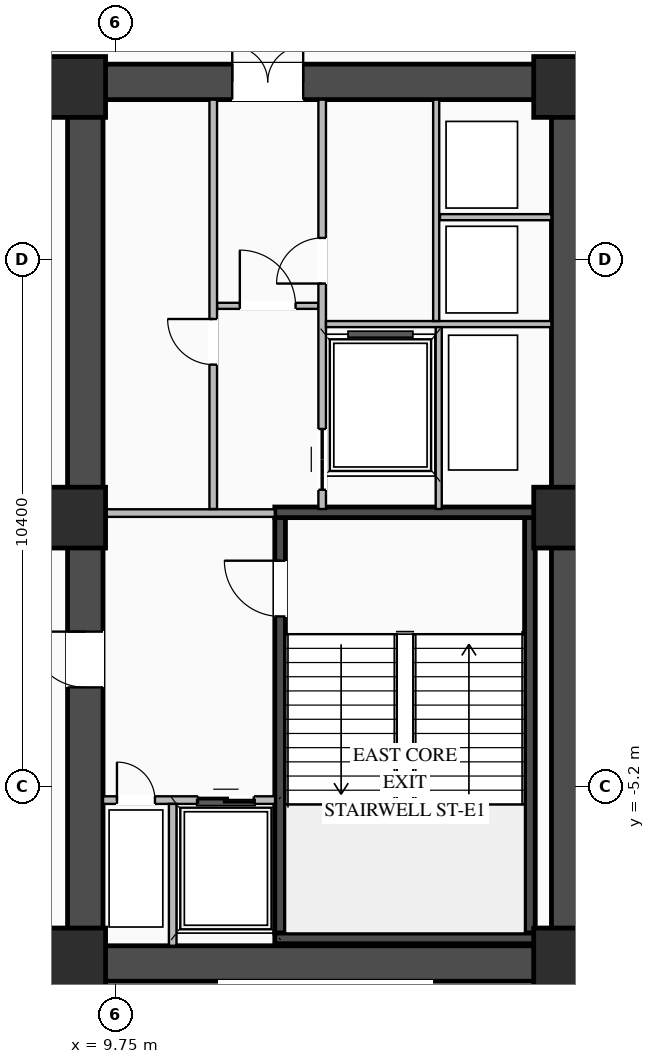
"""IFC4 building model, lengths in metres.
Left out: names, types, materials, properties, quantities, classifications, styles, units other than length and angle.
Written with IfcOpenShell. Run it as: python <this file> out.ifc"""

import sys

from ifc_helpers import new_model, si_unit, direction, frame, frame_2d, origin, origin_2d, place, context, subcontext, project, spatial, rectangle, extrude, element, fill, save


model = new_model("IFC4")
c1 = context("Model", 3, precision=1e-05, world=origin(), true_north=direction((0.0, 1.0)))
c2 = subcontext(c1, "Body", "Model", "MODEL_VIEW")
j1 = project(units=[si_unit("LENGTHUNIT", "METRE"), si_unit("PLANEANGLEUNIT", "RADIAN")], contexts=[c1])
p1 = place(None, origin())
s1 = spatial("IfcSite", under=j1, at=p1, CompositionType="ELEMENT")
p2 = place(p1, origin())
s2 = spatial("IfcBuilding", under=s1, at=p2, CompositionType="ELEMENT")
p3 = place(p2, frame((0.0, 0.0, -4.8)))
s3 = spatial("IfcBuildingStorey", under=s2, at=p3, CompositionType="ELEMENT", Elevation=-4.8)
p4 = place(p3, frame((8.8, -8.7, 0.0), z_axis=(0.0, 0.0, 1.0), x_axis=(1.0, 0.0, 0.0)))
e1 = element("IfcWall", 1, at=p4, inside=s3, PredefinedType="SHEAR", context=c2, shape_type="SweptSolid", body=[
    extrude(rectangle(XDim=10.25, YDim=0.7, at=frame_2d((5.125, 0.0))), origin(), (0.0, 0.0, 1.0), 4.45),
])
p5 = place(p3, frame((8.8, 8.7, 0.0), z_axis=(0.0, 0.0, 1.0), x_axis=(1.0, 0.0, 0.0)))
e2 = element("IfcWall", 2, at=p5, inside=s3, PredefinedType="SHEAR", context=c2, shape_type="SweptSolid", body=[
    extrude(rectangle(XDim=10.25, YDim=0.7, at=frame_2d((5.125, 0.0))), origin(), (0.0, 0.0, 1.0), 4.45),
])
p6 = place(p5, frame((3.25, 0.0, 0.0)))
e3 = element("IfcOpeningElement", 3, at=p6, cuts=e2, PredefinedType="OPENING", context=c2, shape_type="SweptSolid", body=[
    extrude(rectangle(XDim=1.4, YDim=2.05, at=frame_2d((0.7, 1.025))), frame((0.0, 0.36, 0.0), z_axis=(0.0, -1.0, 0.0), x_axis=(1.0, 0.0, 0.0)), (0.0, 0.0, 1.0), 0.72),
])
p7 = place(p3, frame((9.15, -8.35, 0.0), z_axis=(0.0, 0.0, 1.0), x_axis=(0.0, 1.0, 0.0)))
e4 = element("IfcWall", 4, at=p7, inside=s3, PredefinedType="SHEAR", context=c2, shape_type="SweptSolid", body=[
    extrude(rectangle(XDim=16.7, YDim=0.7, at=frame_2d((8.35, 0.0))), origin(), (0.0, 0.0, 1.0), 4.45),
])
p8 = place(p7, frame((5.1, 0.0, 0.0)))
e5 = element("IfcOpeningElement", 5, at=p8, cuts=e4, PredefinedType="OPENING", context=c2, shape_type="SweptSolid", body=[
    extrude(rectangle(XDim=1.1, YDim=2.08, at=frame_2d((0.55, 1.04))), frame((0.0, 0.36, 0.0), z_axis=(0.0, -1.0, 0.0), x_axis=(1.0, 0.0, 0.0)), (0.0, 0.0, 1.0), 0.72),
])
p9 = place(p3, frame((18.7, -8.35, 0.0), z_axis=(0.0, 0.0, 1.0), x_axis=(0.0, 1.0, 0.0)))
e6 = element("IfcWall", 6, at=p9, inside=s3, PredefinedType="SHEAR", context=c2, shape_type="SweptSolid", body=[
    extrude(rectangle(XDim=16.7, YDim=0.7, at=frame_2d((8.35, 0.0))), origin(), (0.0, 0.0, 1.0), 4.45),
])
p10 = place(p3, frame((12.995, -8.1, 0.0), z_axis=(0.0, 0.0, 1.0), x_axis=(0.0, 1.0, 0.0)))
e7 = element("IfcWall", 7, at=p10, inside=s3, PredefinedType="SHEAR", context=c2, shape_type="SweptSolid", body=[
    extrude(rectangle(XDim=8.2, YDim=0.21, at=frame_2d((4.1, 0.0))), origin(), (0.0, 0.0, 1.0), 4.45),
])
p11 = place(p10, frame((6.25, 0.0, 0.0)))
e8 = element("IfcOpeningElement", 8, at=p11, cuts=e7, PredefinedType="OPENING", context=c2, shape_type="SweptSolid", body=[
    extrude(rectangle(XDim=1.1, YDim=2.15, at=frame_2d((0.55, 1.075))), frame((0.0, 0.115, 0.0), z_axis=(0.0, -1.0, 0.0), x_axis=(1.0, 0.0, 0.0)), (0.0, 0.0, 1.0), 0.23),
])
p12 = place(p3, frame((17.925, -8.1, 0.0), z_axis=(0.0, 0.0, 1.0), x_axis=(0.0, 1.0, 0.0)))
e9 = element("IfcWall", 9, at=p12, inside=s3, PredefinedType="SHEAR", context=c2, shape_type="SweptSolid", body=[
    extrude(rectangle(XDim=8.2, YDim=0.21, at=frame_2d((4.1, 0.0))), origin(), (0.0, 0.0, 1.0), 4.45),
])
for number, where, z_axis, x_axis in (
    (10, (12.89, -8.205, 0.0), (0.0, 0.0, 1.0), (1.0, 0.0, 0.0)),
    (11, (18.03, 0.205, 0.0), (0.0, 0.0, 1.0), (-1.0, 0.0, 0.0)),
):
    element("IfcWall", number, at=place(p3, frame(where, z_axis=z_axis, x_axis=x_axis)), inside=s3, PredefinedType="SHEAR", context=c2, shape_type="SweptSolid", body=[
        extrude(rectangle(XDim=5.14, YDim=0.21, at=frame_2d((2.57, 0.0))), origin(), (0.0, 0.0, 1.0), 4.45),
    ])
for number, where, z_axis, x_axis in (
    (12, (8.95, -8.6, 0.0), (0.0, 0.0, 1.0), (1.0, 0.0, 0.0)),
    (13, (8.95, 0.1, 0.0), (0.0, 0.0, 1.0), (1.0, 0.0, 0.0)),
    (14, (8.95, 8.6, 0.0), (0.0, 0.0, 1.0), (1.0, 0.0, 0.0)),
    (15, (18.6, -8.6, 0.0), (0.0, 0.0, 1.0), (1.0, 0.0, 0.0)),
    (16, (18.6, 0.1, 0.0), (0.0, 0.0, 1.0), (1.0, 0.0, 0.0)),
    (17, (18.6, 8.6, 0.0), (0.0, 0.0, 1.0), (1.0, 0.0, 0.0)),
):
    element("IfcColumn", number, at=place(p3, frame(where, z_axis=z_axis, x_axis=x_axis)), inside=s3, PredefinedType="COLUMN", context=c2, shape_type="SweptSolid", body=[
        extrude(rectangle(XDim=1.2, YDim=1.2, at=origin_2d()), origin(), (0.0, 0.0, 1.0), 4.8),
    ])
p13 = place(p3, frame((9.5, -5.475, 0.0), z_axis=(0.0, 0.0, 1.0), x_axis=(1.0, 0.0, 0.0)))
e18 = element("IfcWall", 18, at=p13, inside=s3, PredefinedType="STANDARD", context=c2, shape_type="SweptSolid", body=[
    extrude(rectangle(XDim=3.395, YDim=0.15, at=frame_2d((1.698, 0.0))), origin(), (0.0, 0.0, 1.0), 4.43),
])
p14 = place(p13, frame((1.875, 0.0, 0.0)))
e19 = element("IfcOpeningElement", 19, at=p14, cuts=e18, PredefinedType="OPENING", context=c2, shape_type="SweptSolid", body=[
    extrude(rectangle(XDim=1.1, YDim=2.15, at=frame_2d((0.55, 1.075))), frame((0.0, 0.085, 0.0), z_axis=(0.0, -1.0, 0.0), x_axis=(1.0, 0.0, 0.0)), (0.0, 0.0, 1.0), 0.17),
])
p15 = place(p13, frame((0.275, 0.0, 0.0)))
e20 = element("IfcOpeningElement", 20, at=p15, cuts=e18, PredefinedType="OPENING", context=c2, shape_type="SweptSolid", body=[
    extrude(rectangle(XDim=0.75, YDim=2.05, at=frame_2d((0.375, 1.025))), frame((0.0, 0.085, 0.0), z_axis=(0.0, -1.0, 0.0), x_axis=(1.0, 0.0, 0.0)), (0.0, 0.0, 1.0), 0.17),
])
p16 = place(p3, frame((10.875, -8.35, 0.0), z_axis=(0.0, 0.0, 1.0), x_axis=(0.0, 1.0, 0.0)))
e21 = element("IfcWall", 21, at=p16, inside=s3, PredefinedType="STANDARD", context=c2, shape_type="SweptSolid", body=[
    extrude(rectangle(XDim=2.8, YDim=0.15, at=frame_2d((1.4, 0.0))), origin(), (0.0, 0.0, 1.0), 4.43),
])
p17 = place(p3, frame((9.5, 0.19, 0.0), z_axis=(0.0, 0.0, 1.0), x_axis=(1.0, 0.0, 0.0)))
e22 = element("IfcWall", 22, at=p17, inside=s3, PredefinedType="STANDARD", context=c2, shape_type="SweptSolid", body=[
    extrude(rectangle(XDim=3.39, YDim=0.15, at=frame_2d((1.695, 0.0))), origin(), (0.0, 0.0, 1.0), 3.625),
])
p18 = place(p3, frame((11.75, 4.28, 0.0), z_axis=(0.0, 0.0, 1.0), x_axis=(1.0, 0.0, 0.0)))
e23 = element("IfcWall", 23, at=p18, inside=s3, PredefinedType="STANDARD", context=c2, shape_type="SweptSolid", body=[
    extrude(rectangle(XDim=2.0, YDim=0.12, at=frame_2d((1.0, 0.0))), origin(), (0.0, 0.0, 1.0), 4.43),
])
p19 = place(p18, frame((0.45, 0.0, 0.0)))
e24 = element("IfcOpeningElement", 24, at=p19, cuts=e23, PredefinedType="OPENING", context=c2, shape_type="SweptSolid", body=[
    extrude(rectangle(XDim=1.1, YDim=2.1, at=frame_2d((0.55, 1.05))), frame((0.0, 0.07, 0.0), z_axis=(0.0, -1.0, 0.0), x_axis=(1.0, 0.0, 0.0)), (0.0, 0.0, 1.0), 0.14),
])
p20 = place(p3, frame((11.675, 0.27, 0.0), z_axis=(0.0, 0.0, 1.0), x_axis=(0.0, 1.0, 0.0)))
e25 = element("IfcWall", 25, at=p20, inside=s3, PredefinedType="STANDARD", context=c2, shape_type="SweptSolid", body=[
    extrude(rectangle(XDim=8.08, YDim=0.15, at=frame_2d((4.04, 0.0))), origin(), (0.0, 0.0, 1.0), 4.43),
])
p21 = place(p20, frame((2.85, 0.0, 0.0)))
e26 = element("IfcOpeningElement", 26, at=p21, cuts=e25, PredefinedType="OPENING", context=c2, shape_type="SweptSolid", body=[
    extrude(rectangle(XDim=0.9, YDim=2.05, at=frame_2d((0.45, 1.025))), frame((0.0, 0.085, 0.0), z_axis=(0.0, -1.0, 0.0), x_axis=(1.0, 0.0, 0.0)), (0.0, 0.0, 1.0), 0.17),
])
p22 = place(p3, frame((13.825, 0.27, 0.0), z_axis=(0.0, 0.0, 1.0), x_axis=(0.0, 1.0, 0.0)))
e27 = element("IfcWall", 27, at=p22, inside=s3, PredefinedType="STANDARD", context=c2, shape_type="SweptSolid", body=[
    extrude(rectangle(XDim=8.08, YDim=0.15, at=frame_2d((4.04, 0.0))), origin(), (0.0, 0.0, 1.0), 4.43),
])
p23 = place(p22, frame((4.45, 0.0, 0.0)))
e28 = element("IfcOpeningElement", 28, at=p23, cuts=e27, PredefinedType="OPENING", context=c2, shape_type="SweptSolid", body=[
    extrude(rectangle(XDim=0.9, YDim=2.05, at=frame_2d((0.45, 1.025))), frame((0.0, 0.085, 0.0), z_axis=(0.0, -1.0, 0.0), x_axis=(1.0, 0.0, 0.0)), (0.0, 0.0, 1.0), 0.17),
])
p24 = place(p22, frame((0.38, 0.0, 0.0)))
e29 = element("IfcOpeningElement", 29, at=p24, cuts=e27, PredefinedType="OPENING", context=c2, shape_type="SweptSolid", body=[
    extrude(rectangle(XDim=1.2, YDim=2.1, at=frame_2d((0.6, 1.05))), frame((0.0, 0.085, 0.0), z_axis=(0.0, -1.0, 0.0), x_axis=(1.0, 0.0, 0.0)), (0.0, 0.0, 1.0), 0.17),
])
p25 = place(p3, frame((13.9, 3.92, 0.0), z_axis=(0.0, 0.0, 1.0), x_axis=(1.0, 0.0, 0.0)))
e30 = element("IfcWall", 30, at=p25, inside=s3, PredefinedType="STANDARD", context=c2, shape_type="SweptSolid", body=[
    extrude(rectangle(XDim=4.45, YDim=0.12, at=frame_2d((2.225, 0.0))), origin(), (0.0, 0.0, 1.0), 4.43),
])
p26 = place(p3, frame((16.15, 6.03, 0.0), z_axis=(0.0, 0.0, 1.0), x_axis=(1.0, 0.0, 0.0)))
e31 = element("IfcWall", 31, at=p26, inside=s3, PredefinedType="STANDARD", context=c2, shape_type="SweptSolid", body=[
    extrude(rectangle(XDim=2.2, YDim=0.12, at=frame_2d((1.1, 0.0))), origin(), (0.0, 0.0, 1.0), 4.43),
])
p27 = place(p3, frame((16.075, 3.98, 0.0), z_axis=(0.0, 0.0, 1.0), x_axis=(0.0, 1.0, 0.0)))
e32 = element("IfcWall", 32, at=p27, inside=s3, PredefinedType="STANDARD", context=c2, shape_type="SweptSolid", body=[
    extrude(rectangle(XDim=4.37, YDim=0.12, at=frame_2d((2.185, 0.0))), origin(), (0.0, 0.0, 1.0), 4.43),
])
p28 = place(p3, frame((16.125, 0.27, 0.0), z_axis=(0.0, 0.0, 1.0), x_axis=(0.0, 1.0, 0.0)))
e33 = element("IfcWall", 33, at=p28, inside=s3, PredefinedType="STANDARD", context=c2, shape_type="SweptSolid", body=[
    extrude(rectangle(XDim=3.59, YDim=0.12, at=frame_2d((1.795, 0.0))), origin(), (0.0, 0.0, 1.0), 4.43),
])
p29 = place(p11, origin())
e34 = element("IfcDoor", 34, at=p29, inside=s3, OperationType="SINGLE_SWING_RIGHT", PredefinedType="DOOR", context=c2, shape_type="SweptSolid", body=[
    extrude(rectangle(XDim=1.1, YDim=2.15, at=frame_2d((0.55, 1.075))), frame((0.0, 0.025, 0.0), z_axis=(0.0, -1.0, 0.0), x_axis=(1.0, 0.0, 0.0)), (0.0, 0.0, 1.0), 0.05),
])
fill(e8, e34)
p30 = place(p14, origin())
e35 = element("IfcDoor", 35, at=p30, inside=s3, OperationType="DOUBLE_DOOR_SLIDING", PredefinedType="DOOR", context=c2, shape_type="SweptSolid", body=[
    extrude(rectangle(XDim=1.1, YDim=2.15, at=frame_2d((0.55, 1.075))), frame((0.0, 0.025, 0.0), z_axis=(0.0, -1.0, 0.0), x_axis=(1.0, 0.0, 0.0)), (0.0, 0.0, 1.0), 0.05),
])
fill(e19, e35)
p31 = place(p15, origin())
e36 = element("IfcDoor", 36, at=p31, inside=s3, OperationType="SINGLE_SWING_LEFT", PredefinedType="DOOR", context=c2, shape_type="SweptSolid", body=[
    extrude(rectangle(XDim=0.75, YDim=2.05, at=frame_2d((0.375, 1.025))), frame((0.0, 0.025, 0.0), z_axis=(0.0, -1.0, 0.0), x_axis=(1.0, 0.0, 0.0)), (0.0, 0.0, 1.0), 0.05),
])
fill(e20, e36)
p32 = place(p8, origin())
e37 = element("IfcDoor", 37, at=p32, inside=s3, OperationType="SINGLE_SWING_RIGHT", PredefinedType="DOOR", context=c2, shape_type="SweptSolid", body=[
    extrude(rectangle(XDim=1.1, YDim=2.08, at=frame_2d((0.55, 1.04))), frame((0.0, -0.255, 0.0), z_axis=(0.0, -1.0, 0.0), x_axis=(1.0, 0.0, 0.0)), (0.0, 0.0, 1.0), 0.05),
])
fill(e5, e37)
p33 = place(p19, origin())
e38 = element("IfcDoor", 38, at=p33, inside=s3, OperationType="SINGLE_SWING_LEFT", PredefinedType="DOOR", context=c2, shape_type="SweptSolid", body=[
    extrude(rectangle(XDim=1.1, YDim=2.1, at=frame_2d((0.55, 1.05))), frame((0.0, 0.025, 0.0), z_axis=(0.0, -1.0, 0.0), x_axis=(1.0, 0.0, 0.0)), (0.0, 0.0, 1.0), 0.05),
])
fill(e24, e38)
p34 = place(p6, origin())
e39 = element("IfcDoor", 39, at=p34, inside=s3, OperationType="DOUBLE_DOOR_SINGLE_SWING", PredefinedType="DOOR", context=c2, shape_type="SweptSolid", body=[
    extrude(rectangle(XDim=1.4, YDim=2.05, at=frame_2d((0.7, 1.025))), frame((0.0, 0.295, 0.0), z_axis=(0.0, -1.0, 0.0), x_axis=(1.0, 0.0, 0.0)), (0.0, 0.0, 1.0), 0.05),
])
fill(e3, e39)
p35 = place(p21, origin())
e40 = element("IfcDoor", 40, at=p35, inside=s3, OperationType="SINGLE_SWING_RIGHT", PredefinedType="DOOR", context=c2, shape_type="SweptSolid", body=[
    extrude(rectangle(XDim=0.9, YDim=2.05, at=frame_2d((0.45, 1.025))), frame((0.0, 0.025, 0.0), z_axis=(0.0, -1.0, 0.0), x_axis=(1.0, 0.0, 0.0)), (0.0, 0.0, 1.0), 0.05),
])
fill(e26, e40)
p36 = place(p23, origin())
e41 = element("IfcDoor", 41, at=p36, inside=s3, OperationType="SINGLE_SWING_LEFT", PredefinedType="DOOR", context=c2, shape_type="SweptSolid", body=[
    extrude(rectangle(XDim=0.9, YDim=2.05, at=frame_2d((0.45, 1.025))), frame((0.0, 0.025, 0.0), z_axis=(0.0, -1.0, 0.0), x_axis=(1.0, 0.0, 0.0)), (0.0, 0.0, 1.0), 0.05),
])
fill(e28, e41)
p37 = place(p24, origin())
e42 = element("IfcDoor", 42, at=p37, inside=s3, OperationType="DOUBLE_DOOR_SLIDING", PredefinedType="DOOR", context=c2, shape_type="SweptSolid", body=[
    extrude(rectangle(XDim=1.2, YDim=2.1, at=frame_2d((0.6, 1.05))), frame((0.0, 0.025, 0.0), z_axis=(0.0, -1.0, 0.0), x_axis=(1.0, 0.0, 0.0)), (0.0, 0.0, 1.0), 0.05),
])
fill(e29, e42)
save(model, sys.argv[1])
